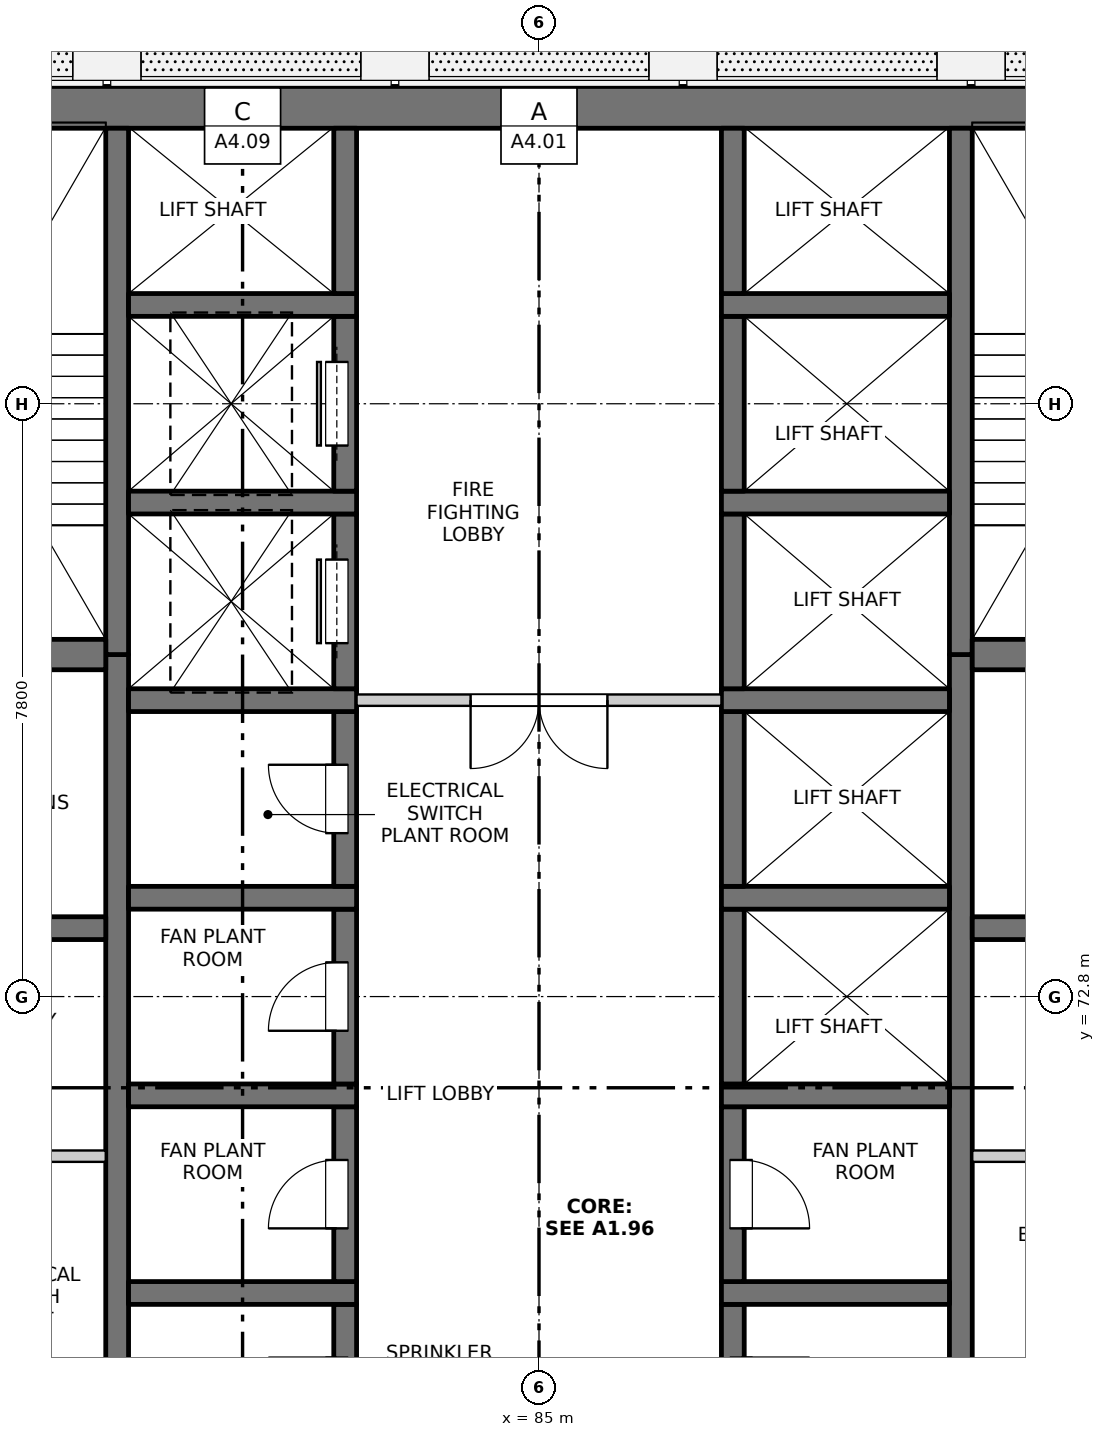
"""IFC4 building model, lengths in metres.
Left out: names, types, materials, properties, quantities, classifications, styles, units other than length and angle.
Written with IfcOpenShell. Run it as: python <this file> out.ifc"""

import sys

from ifc_helpers import new_model, si_unit, direction, frame, frame_2d, origin, place, context, subcontext, project, spatial, rectangle, extrude, element, fill, save


model = new_model("IFC4")
c1 = context("Model", 3, precision=1e-05, world=origin(), true_north=direction((0.0, 1.0)))
c2 = subcontext(c1, "Body", "Model", "MODEL_VIEW")
j1 = project(units=[si_unit("LENGTHUNIT", "METRE"), si_unit("PLANEANGLEUNIT", "RADIAN")], contexts=[c1])
p1 = place(None, origin())
s1 = spatial("IfcSite", under=j1, at=p1, CompositionType="ELEMENT")
p2 = place(p1, origin())
s2 = spatial("IfcBuilding", under=s1, at=p2, CompositionType="ELEMENT")
p3 = place(p2, frame((0.0, 0.0, 172.4)))
s3 = spatial("IfcBuildingStorey", under=s2, at=p3, CompositionType="ELEMENT", Elevation=172.4)
p4 = place(p3, frame((75.525, 84.5, -0.3), z_axis=(0.0, 0.0, 1.0), x_axis=(1.0, 0.0, 0.0)))
e1 = element("IfcWall", 1, at=p4, inside=s3, PredefinedType="SOLIDWALL", context=c2, shape_type="SweptSolid", body=[
    extrude(rectangle(XDim=18.95, YDim=0.55, at=frame_2d((9.475, 0.0))), origin(), (0.0, 0.0, 1.0), 6.8),
])
p5 = place(p3, frame((79.45, 60.95, -0.3), z_axis=(0.0, 0.0, 1.0), x_axis=(0.0, 1.0, 0.0)))
e2 = element("IfcWall", 2, at=p5, inside=s3, PredefinedType="SOLIDWALL", context=c2, shape_type="SweptSolid", body=[
    extrude(rectangle(XDim=16.35, YDim=0.3, at=frame_2d((8.175, 0.0))), origin(), (0.0, 0.0, 1.0), 6.8),
])
p6 = place(p3, frame((79.45, 77.3, -0.3), z_axis=(0.0, 0.0, 1.0), x_axis=(0.0, 1.0, 0.0)))
e3 = element("IfcWall", 3, at=p6, inside=s3, PredefinedType="SOLIDWALL", context=c2, shape_type="SweptSolid", body=[
    extrude(rectangle(XDim=6.925, YDim=0.3, at=frame_2d((3.462, 0.0))), origin(), (0.0, 0.0, 1.0), 6.8),
])
p7 = place(p3, frame((90.55, 61.95, -0.3), z_axis=(0.0, 0.0, 1.0), x_axis=(0.0, 1.0, 0.0)))
e4 = element("IfcWall", 4, at=p7, inside=s3, PredefinedType="SOLIDWALL", context=c2, shape_type="SweptSolid", body=[
    extrude(rectangle(XDim=15.35, YDim=0.3, at=frame_2d((7.675, 0.0))), origin(), (0.0, 0.0, 1.0), 6.8),
])
p8 = place(p3, frame((90.55, 77.3, -0.3), z_axis=(0.0, 0.0, 1.0), x_axis=(0.0, 1.0, 0.0)))
e5 = element("IfcWall", 5, at=p8, inside=s3, PredefinedType="SOLIDWALL", context=c2, shape_type="SweptSolid", body=[
    extrude(rectangle(XDim=6.925, YDim=0.3, at=frame_2d((3.462, 0.0))), origin(), (0.0, 0.0, 1.0), 6.8),
])
p9 = place(p3, frame((82.45, 66.45, -0.3), z_axis=(0.0, 0.0, 1.0), x_axis=(0.0, 1.0, 0.0)))
e6 = element("IfcWall", 6, at=p9, inside=s3, PredefinedType="SOLIDWALL", context=c2, shape_type="SweptSolid", body=[
    extrude(rectangle(XDim=2.3, YDim=0.3, at=frame_2d((1.15, 0.0))), origin(), (0.0, 0.0, 1.0), 6.8),
])
p10 = place(p9, frame((0.7, 0.0, 0.3)))
e7 = element("IfcOpeningElement", 7, at=p10, cuts=e6, PredefinedType="OPENING", context=c2, shape_type="SweptSolid", body=[
    extrude(rectangle(XDim=0.9, YDim=2.1, at=frame_2d((0.45, 1.05))), frame((0.0, 0.16, 0.0), z_axis=(0.0, -1.0, 0.0), x_axis=(1.0, 0.0, 0.0)), (0.0, 0.0, 1.0), 0.32),
])
p11 = place(p3, frame((79.6, 68.9, -0.3), z_axis=(0.0, 0.0, 1.0), x_axis=(1.0, 0.0, 0.0)))
e8 = element("IfcWall", 8, at=p11, inside=s3, PredefinedType="SOLIDWALL", context=c2, shape_type="SweptSolid", body=[
    extrude(rectangle(XDim=3.0, YDim=0.3, at=frame_2d((1.5, 0.0))), origin(), (0.0, 0.0, 1.0), 6.8),
])
p12 = place(p3, frame((82.45, 69.05, -0.3), z_axis=(0.0, 0.0, 1.0), x_axis=(0.0, 1.0, 0.0)))
e9 = element("IfcWall", 9, at=p12, inside=s3, PredefinedType="SOLIDWALL", context=c2, shape_type="SweptSolid", body=[
    extrude(rectangle(XDim=2.3, YDim=0.3, at=frame_2d((1.15, 0.0))), origin(), (0.0, 0.0, 1.0), 6.8),
])
p13 = place(p12, frame((0.7, 0.0, 0.3)))
e10 = element("IfcOpeningElement", 10, at=p13, cuts=e9, PredefinedType="OPENING", context=c2, shape_type="SweptSolid", body=[
    extrude(rectangle(XDim=0.9, YDim=2.1, at=frame_2d((0.45, 1.05))), frame((0.0, 0.16, 0.0), z_axis=(0.0, -1.0, 0.0), x_axis=(1.0, 0.0, 0.0)), (0.0, 0.0, 1.0), 0.32),
])
p14 = place(p3, frame((79.6, 71.5, -0.3), z_axis=(0.0, 0.0, 1.0), x_axis=(1.0, 0.0, 0.0)))
e11 = element("IfcWall", 11, at=p14, inside=s3, PredefinedType="SOLIDWALL", context=c2, shape_type="SweptSolid", body=[
    extrude(rectangle(XDim=3.0, YDim=0.3, at=frame_2d((1.5, 0.0))), origin(), (0.0, 0.0, 1.0), 6.8),
])
p15 = place(p3, frame((82.45, 71.65, -0.3), z_axis=(0.0, 0.0, 1.0), x_axis=(0.0, 1.0, 0.0)))
e12 = element("IfcWall", 12, at=p15, inside=s3, PredefinedType="SOLIDWALL", context=c2, shape_type="SweptSolid", body=[
    extrude(rectangle(XDim=2.3, YDim=0.3, at=frame_2d((1.15, 0.0))), origin(), (0.0, 0.0, 1.0), 6.8),
])
p16 = place(p15, frame((0.7, 0.0, 0.3)))
e13 = element("IfcOpeningElement", 13, at=p16, cuts=e12, PredefinedType="OPENING", context=c2, shape_type="SweptSolid", body=[
    extrude(rectangle(XDim=0.9, YDim=2.1, at=frame_2d((0.45, 1.05))), frame((0.0, 0.16, 0.0), z_axis=(0.0, -1.0, 0.0), x_axis=(1.0, 0.0, 0.0)), (0.0, 0.0, 1.0), 0.32),
])
p17 = place(p3, frame((79.6, 74.1, -0.3), z_axis=(0.0, 0.0, 1.0), x_axis=(1.0, 0.0, 0.0)))
e14 = element("IfcWall", 14, at=p17, inside=s3, PredefinedType="SOLIDWALL", context=c2, shape_type="SweptSolid", body=[
    extrude(rectangle(XDim=3.0, YDim=0.3, at=frame_2d((1.5, 0.0))), origin(), (0.0, 0.0, 1.0), 6.8),
])
p18 = place(p3, frame((82.45, 74.25, -0.3), z_axis=(0.0, 0.0, 1.0), x_axis=(0.0, 1.0, 0.0)))
e15 = element("IfcWall", 15, at=p18, inside=s3, PredefinedType="SOLIDWALL", context=c2, shape_type="SweptSolid", body=[
    extrude(rectangle(XDim=2.3, YDim=0.3, at=frame_2d((1.15, 0.0))), origin(), (0.0, 0.0, 1.0), 6.8),
])
p19 = place(p18, frame((0.7, 0.0, 0.3)))
e16 = element("IfcOpeningElement", 16, at=p19, cuts=e15, PredefinedType="OPENING", context=c2, shape_type="SweptSolid", body=[
    extrude(rectangle(XDim=0.9, YDim=2.1, at=frame_2d((0.45, 1.05))), frame((0.0, 0.16, 0.0), z_axis=(0.0, -1.0, 0.0), x_axis=(1.0, 0.0, 0.0)), (0.0, 0.0, 1.0), 0.32),
])
p20 = place(p3, frame((79.6, 76.7, -0.3), z_axis=(0.0, 0.0, 1.0), x_axis=(1.0, 0.0, 0.0)))
e17 = element("IfcWall", 17, at=p20, inside=s3, PredefinedType="SOLIDWALL", context=c2, shape_type="SweptSolid", body=[
    extrude(rectangle(XDim=3.0, YDim=0.3, at=frame_2d((1.5, 0.0))), origin(), (0.0, 0.0, 1.0), 6.8),
])
p21 = place(p3, frame((82.45, 76.85, -0.3), z_axis=(0.0, 0.0, 1.0), x_axis=(0.0, 1.0, 0.0)))
e18 = element("IfcWall", 18, at=p21, inside=s3, PredefinedType="SOLIDWALL", context=c2, shape_type="SweptSolid", body=[
    extrude(rectangle(XDim=2.3, YDim=0.3, at=frame_2d((1.15, 0.0))), origin(), (0.0, 0.0, 1.0), 6.8),
])
p22 = place(p21, frame((0.6, 0.0, 0.3)))
e19 = element("IfcOpeningElement", 19, at=p22, cuts=e18, PredefinedType="OPENING", context=c2, shape_type="SweptSolid", body=[
    extrude(rectangle(XDim=1.1, YDim=2.1, at=frame_2d((0.55, 1.05))), frame((0.0, 0.16, 0.0), z_axis=(0.0, -1.0, 0.0), x_axis=(1.0, 0.0, 0.0)), (0.0, 0.0, 1.0), 0.32),
])
p23 = place(p3, frame((79.6, 79.3, -0.3), z_axis=(0.0, 0.0, 1.0), x_axis=(1.0, 0.0, 0.0)))
e20 = element("IfcWall", 20, at=p23, inside=s3, PredefinedType="SOLIDWALL", context=c2, shape_type="SweptSolid", body=[
    extrude(rectangle(XDim=3.0, YDim=0.3, at=frame_2d((1.5, 0.0))), origin(), (0.0, 0.0, 1.0), 6.8),
])
p24 = place(p3, frame((82.45, 79.45, -0.3), z_axis=(0.0, 0.0, 1.0), x_axis=(0.0, 1.0, 0.0)))
e21 = element("IfcWall", 21, at=p24, inside=s3, PredefinedType="SOLIDWALL", context=c2, shape_type="SweptSolid", body=[
    extrude(rectangle(XDim=2.3, YDim=0.3, at=frame_2d((1.15, 0.0))), origin(), (0.0, 0.0, 1.0), 6.8),
])
p25 = place(p24, frame((0.6, 0.0, 0.3)))
e22 = element("IfcOpeningElement", 22, at=p25, cuts=e21, PredefinedType="OPENING", context=c2, shape_type="SweptSolid", body=[
    extrude(rectangle(XDim=1.1, YDim=2.1, at=frame_2d((0.55, 1.05))), frame((0.0, 0.16, 0.0), z_axis=(0.0, -1.0, 0.0), x_axis=(1.0, 0.0, 0.0)), (0.0, 0.0, 1.0), 0.32),
])
p26 = place(p3, frame((79.6, 81.9, -0.3), z_axis=(0.0, 0.0, 1.0), x_axis=(1.0, 0.0, 0.0)))
e23 = element("IfcWall", 23, at=p26, inside=s3, PredefinedType="SOLIDWALL", context=c2, shape_type="SweptSolid", body=[
    extrude(rectangle(XDim=3.0, YDim=0.3, at=frame_2d((1.5, 0.0))), origin(), (0.0, 0.0, 1.0), 6.8),
])
p27 = place(p3, frame((82.45, 82.05, -0.3), z_axis=(0.0, 0.0, 1.0), x_axis=(0.0, 1.0, 0.0)))
e24 = element("IfcWall", 24, at=p27, inside=s3, PredefinedType="SOLIDWALL", context=c2, shape_type="SweptSolid", body=[
    extrude(rectangle(XDim=2.175, YDim=0.3, at=frame_2d((1.087, 0.0))), origin(), (0.0, 0.0, 1.0), 6.8),
])
p28 = place(p3, frame((87.55, 66.45, -0.3), z_axis=(0.0, 0.0, 1.0), x_axis=(0.0, 1.0, 0.0)))
e25 = element("IfcWall", 25, at=p28, inside=s3, PredefinedType="SOLIDWALL", context=c2, shape_type="SweptSolid", body=[
    extrude(rectangle(XDim=2.3, YDim=0.3, at=frame_2d((1.15, 0.0))), origin(), (0.0, 0.0, 1.0), 6.8),
])
p29 = place(p28, frame((0.7, 0.0, 0.3)))
e26 = element("IfcOpeningElement", 26, at=p29, cuts=e25, PredefinedType="OPENING", context=c2, shape_type="SweptSolid", body=[
    extrude(rectangle(XDim=0.9, YDim=2.1, at=frame_2d((0.45, 1.05))), frame((0.0, 0.16, 0.0), z_axis=(0.0, -1.0, 0.0), x_axis=(1.0, 0.0, 0.0)), (0.0, 0.0, 1.0), 0.32),
])
p30 = place(p3, frame((87.4, 68.9, -0.3), z_axis=(0.0, 0.0, 1.0), x_axis=(1.0, 0.0, 0.0)))
e27 = element("IfcWall", 27, at=p30, inside=s3, PredefinedType="SOLIDWALL", context=c2, shape_type="SweptSolid", body=[
    extrude(rectangle(XDim=3.0, YDim=0.3, at=frame_2d((1.5, 0.0))), origin(), (0.0, 0.0, 1.0), 6.8),
])
p31 = place(p3, frame((87.55, 69.05, -0.3), z_axis=(0.0, 0.0, 1.0), x_axis=(0.0, 1.0, 0.0)))
e28 = element("IfcWall", 28, at=p31, inside=s3, PredefinedType="SOLIDWALL", context=c2, shape_type="SweptSolid", body=[
    extrude(rectangle(XDim=2.3, YDim=0.3, at=frame_2d((1.15, 0.0))), origin(), (0.0, 0.0, 1.0), 6.8),
])
p32 = place(p31, frame((0.7, 0.0, 0.3)))
e29 = element("IfcOpeningElement", 29, at=p32, cuts=e28, PredefinedType="OPENING", context=c2, shape_type="SweptSolid", body=[
    extrude(rectangle(XDim=0.9, YDim=2.1, at=frame_2d((0.45, 1.05))), frame((0.0, 0.16, 0.0), z_axis=(0.0, -1.0, 0.0), x_axis=(1.0, 0.0, 0.0)), (0.0, 0.0, 1.0), 0.32),
])
p33 = place(p3, frame((87.4, 71.5, -0.3), z_axis=(0.0, 0.0, 1.0), x_axis=(1.0, 0.0, 0.0)))
e30 = element("IfcWall", 30, at=p33, inside=s3, PredefinedType="SOLIDWALL", context=c2, shape_type="SweptSolid", body=[
    extrude(rectangle(XDim=3.0, YDim=0.3, at=frame_2d((1.5, 0.0))), origin(), (0.0, 0.0, 1.0), 6.8),
])
p34 = place(p3, frame((87.55, 71.65, -0.3), z_axis=(0.0, 0.0, 1.0), x_axis=(0.0, 1.0, 0.0)))
e31 = element("IfcWall", 31, at=p34, inside=s3, PredefinedType="SOLIDWALL", context=c2, shape_type="SweptSolid", body=[
    extrude(rectangle(XDim=2.3, YDim=0.3, at=frame_2d((1.15, 0.0))), origin(), (0.0, 0.0, 1.0), 6.8),
])
p35 = place(p3, frame((87.4, 74.1, -0.3), z_axis=(0.0, 0.0, 1.0), x_axis=(1.0, 0.0, 0.0)))
e32 = element("IfcWall", 32, at=p35, inside=s3, PredefinedType="SOLIDWALL", context=c2, shape_type="SweptSolid", body=[
    extrude(rectangle(XDim=3.0, YDim=0.3, at=frame_2d((1.5, 0.0))), origin(), (0.0, 0.0, 1.0), 6.8),
])
p36 = place(p3, frame((87.55, 74.25, -0.3), z_axis=(0.0, 0.0, 1.0), x_axis=(0.0, 1.0, 0.0)))
e33 = element("IfcWall", 33, at=p36, inside=s3, PredefinedType="SOLIDWALL", context=c2, shape_type="SweptSolid", body=[
    extrude(rectangle(XDim=2.3, YDim=0.3, at=frame_2d((1.15, 0.0))), origin(), (0.0, 0.0, 1.0), 6.8),
])
p37 = place(p3, frame((87.4, 76.7, -0.3), z_axis=(0.0, 0.0, 1.0), x_axis=(1.0, 0.0, 0.0)))
e34 = element("IfcWall", 34, at=p37, inside=s3, PredefinedType="SOLIDWALL", context=c2, shape_type="SweptSolid", body=[
    extrude(rectangle(XDim=3.0, YDim=0.3, at=frame_2d((1.5, 0.0))), origin(), (0.0, 0.0, 1.0), 6.8),
])
p38 = place(p3, frame((87.55, 76.85, -0.3), z_axis=(0.0, 0.0, 1.0), x_axis=(0.0, 1.0, 0.0)))
e35 = element("IfcWall", 35, at=p38, inside=s3, PredefinedType="SOLIDWALL", context=c2, shape_type="SweptSolid", body=[
    extrude(rectangle(XDim=2.3, YDim=0.3, at=frame_2d((1.15, 0.0))), origin(), (0.0, 0.0, 1.0), 6.8),
])
p39 = place(p3, frame((87.4, 79.3, -0.3), z_axis=(0.0, 0.0, 1.0), x_axis=(1.0, 0.0, 0.0)))
e36 = element("IfcWall", 36, at=p39, inside=s3, PredefinedType="SOLIDWALL", context=c2, shape_type="SweptSolid", body=[
    extrude(rectangle(XDim=3.0, YDim=0.3, at=frame_2d((1.5, 0.0))), origin(), (0.0, 0.0, 1.0), 6.8),
])
p40 = place(p3, frame((87.55, 79.45, -0.3), z_axis=(0.0, 0.0, 1.0), x_axis=(0.0, 1.0, 0.0)))
e37 = element("IfcWall", 37, at=p40, inside=s3, PredefinedType="SOLIDWALL", context=c2, shape_type="SweptSolid", body=[
    extrude(rectangle(XDim=2.3, YDim=0.3, at=frame_2d((1.15, 0.0))), origin(), (0.0, 0.0, 1.0), 6.8),
])
p41 = place(p3, frame((87.4, 81.9, -0.3), z_axis=(0.0, 0.0, 1.0), x_axis=(1.0, 0.0, 0.0)))
e38 = element("IfcWall", 38, at=p41, inside=s3, PredefinedType="SOLIDWALL", context=c2, shape_type="SweptSolid", body=[
    extrude(rectangle(XDim=3.0, YDim=0.3, at=frame_2d((1.5, 0.0))), origin(), (0.0, 0.0, 1.0), 6.8),
])
p42 = place(p3, frame((87.55, 82.05, -0.3), z_axis=(0.0, 0.0, 1.0), x_axis=(0.0, 1.0, 0.0)))
e39 = element("IfcWall", 39, at=p42, inside=s3, PredefinedType="SOLIDWALL", context=c2, shape_type="SweptSolid", body=[
    extrude(rectangle(XDim=2.175, YDim=0.3, at=frame_2d((1.087, 0.0))), origin(), (0.0, 0.0, 1.0), 6.8),
])
p43 = place(p3, frame((75.525, 73.7, -0.3), z_axis=(0.0, 0.0, 1.0), x_axis=(1.0, 0.0, 0.0)))
e40 = element("IfcWall", 40, at=p43, inside=s3, PredefinedType="SOLIDWALL", context=c2, shape_type="SweptSolid", body=[
    extrude(rectangle(XDim=3.775, YDim=0.3, at=frame_2d((1.888, 0.0))), origin(), (0.0, 0.0, 1.0), 6.8),
])
p44 = place(p3, frame((75.525, 77.3, -0.3), z_axis=(0.0, 0.0, 1.0), x_axis=(1.0, 0.0, 0.0)))
e41 = element("IfcWall", 41, at=p44, inside=s3, PredefinedType="SOLIDWALL", context=c2, shape_type="SweptSolid", body=[
    extrude(rectangle(XDim=3.775, YDim=0.4, at=frame_2d((1.888, 0.0))), origin(), (0.0, 0.0, 1.0), 6.8),
])
p45 = place(p3, frame((90.7, 73.7, -0.3), z_axis=(0.0, 0.0, 1.0), x_axis=(1.0, 0.0, 0.0)))
e42 = element("IfcWall", 42, at=p45, inside=s3, PredefinedType="SOLIDWALL", context=c2, shape_type="SweptSolid", body=[
    extrude(rectangle(XDim=3.775, YDim=0.3, at=frame_2d((1.888, 0.0))), origin(), (0.0, 0.0, 1.0), 6.8),
])
p46 = place(p3, frame((90.7, 77.3, -0.3), z_axis=(0.0, 0.0, 1.0), x_axis=(1.0, 0.0, 0.0)))
e43 = element("IfcWall", 43, at=p46, inside=s3, PredefinedType="SOLIDWALL", context=c2, shape_type="SweptSolid", body=[
    extrude(rectangle(XDim=3.775, YDim=0.4, at=frame_2d((1.888, 0.0))), origin(), (0.0, 0.0, 1.0), 6.8),
])
for number, where, z_axis, x_axis in (
    (44, (75.525, 70.7, 0.0), (0.0, 0.0, 1.0), (1.0, 0.0, 0.0)),
    (45, (90.7, 70.7, 0.0), (0.0, 0.0, 1.0), (1.0, 0.0, 0.0)),
):
    element("IfcWall", number, at=place(p3, frame(where, z_axis=z_axis, x_axis=x_axis)), inside=s3, PredefinedType="PARTITIONING", context=c2, shape_type="SweptSolid", body=[
        extrude(rectangle(XDim=3.775, YDim=0.15, at=frame_2d((1.887, 0.0))), origin(), (0.0, 0.0, 1.0), 6.5),
    ])
p47 = place(p3, frame((82.6, 76.7, 0.0), z_axis=(0.0, 0.0, 1.0), x_axis=(1.0, 0.0, 0.0)))
e46 = element("IfcWall", 46, at=p47, inside=s3, PredefinedType="PARTITIONING", context=c2, shape_type="SweptSolid", body=[
    extrude(rectangle(XDim=4.8, YDim=0.15, at=frame_2d((2.4, 0.0))), origin(), (0.0, 0.0, 1.0), 6.5),
])
p48 = place(p47, frame((1.5, 0.0, 0.0)))
e47 = element("IfcOpeningElement", 47, at=p48, cuts=e46, PredefinedType="OPENING", context=c2, shape_type="SweptSolid", body=[
    extrude(rectangle(XDim=1.8, YDim=2.1, at=frame_2d((0.9, 1.05))), frame((0.0, 0.085, 0.0), z_axis=(0.0, -1.0, 0.0), x_axis=(1.0, 0.0, 0.0)), (0.0, 0.0, 1.0), 0.17),
])
p49 = place(p13, origin())
e48 = element("IfcDoor", 48, at=p49, inside=s3, OperationType="SINGLE_SWING_LEFT", PredefinedType="DOOR", context=c2, shape_type="SweptSolid", body=[
    extrude(rectangle(XDim=0.9, YDim=2.1, at=frame_2d((0.45, 1.05))), frame((0.0, 0.135, 0.0), z_axis=(0.0, -1.0, 0.0), x_axis=(1.0, 0.0, 0.0)), (0.0, 0.0, 1.0), 0.05),
])
fill(e10, e48)
p50 = place(p32, origin())
e49 = element("IfcDoor", 49, at=p50, inside=s3, OperationType="SINGLE_SWING_RIGHT", PredefinedType="DOOR", context=c2, shape_type="SweptSolid", body=[
    extrude(rectangle(XDim=0.9, YDim=2.1, at=frame_2d((0.45, 1.05))), frame((0.0, -0.085, 0.0), z_axis=(0.0, -1.0, 0.0), x_axis=(1.0, 0.0, 0.0)), (0.0, 0.0, 1.0), 0.05),
])
fill(e29, e49)
p51 = place(p16, origin())
e50 = element("IfcDoor", 50, at=p51, inside=s3, OperationType="SINGLE_SWING_LEFT", PredefinedType="DOOR", context=c2, shape_type="SweptSolid", body=[
    extrude(rectangle(XDim=0.9, YDim=2.1, at=frame_2d((0.45, 1.05))), frame((0.0, 0.135, 0.0), z_axis=(0.0, -1.0, 0.0), x_axis=(1.0, 0.0, 0.0)), (0.0, 0.0, 1.0), 0.05),
])
fill(e13, e50)
p52 = place(p19, origin())
e51 = element("IfcDoor", 51, at=p52, inside=s3, OperationType="SINGLE_SWING_RIGHT", PredefinedType="DOOR", context=c2, shape_type="SweptSolid", body=[
    extrude(rectangle(XDim=0.9, YDim=2.1, at=frame_2d((0.45, 1.05))), frame((0.0, 0.135, 0.0), z_axis=(0.0, -1.0, 0.0), x_axis=(1.0, 0.0, 0.0)), (0.0, 0.0, 1.0), 0.05),
])
fill(e16, e51)
p53 = place(p48, origin())
e52 = element("IfcDoor", 52, at=p53, inside=s3, OperationType="DOUBLE_DOOR_SINGLE_SWING", PredefinedType="DOOR", context=c2, shape_type="SweptSolid", body=[
    extrude(rectangle(XDim=1.8, YDim=2.1, at=frame_2d((0.9, 1.05))), frame((0.0, 0.025, 0.0), z_axis=(0.0, -1.0, 0.0), x_axis=(1.0, 0.0, 0.0)), (0.0, 0.0, 1.0), 0.05),
])
fill(e47, e52)
p54 = place(p22, origin())
e53 = element("IfcDoor", 53, at=p54, inside=s3, OperationType="SLIDING_TO_LEFT", PredefinedType="DOOR", context=c2, shape_type="SweptSolid", body=[
    extrude(rectangle(XDim=1.1, YDim=2.1, at=frame_2d((0.55, 1.05))), frame((0.0, 0.135, 0.0), z_axis=(0.0, -1.0, 0.0), x_axis=(1.0, 0.0, 0.0)), (0.0, 0.0, 1.0), 0.05),
])
fill(e19, e53)
p55 = place(p25, origin())
e54 = element("IfcDoor", 54, at=p55, inside=s3, OperationType="SLIDING_TO_LEFT", PredefinedType="DOOR", context=c2, shape_type="SweptSolid", body=[
    extrude(rectangle(XDim=1.1, YDim=2.1, at=frame_2d((0.55, 1.05))), frame((0.0, 0.135, 0.0), z_axis=(0.0, -1.0, 0.0), x_axis=(1.0, 0.0, 0.0)), (0.0, 0.0, 1.0), 0.05),
])
fill(e22, e54)
save(model, sys.argv[1])
